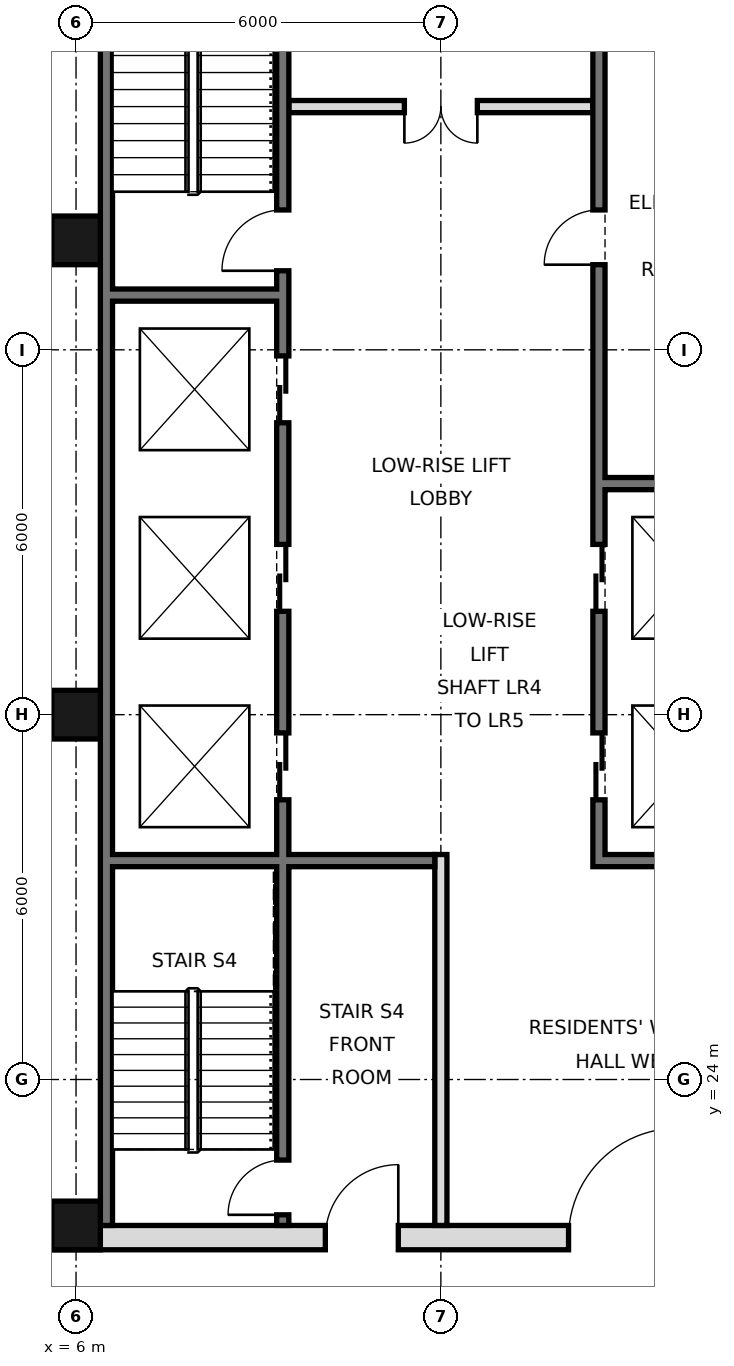
"""IFC4 building model, lengths in metres.
Left out: names, types, materials, properties, quantities, classifications, styles, units other than length and angle.
Written with IfcOpenShell. Run it as: python <this file> out.ifc"""

import sys

from ifc_helpers import new_model, si_unit, direction, frame, frame_2d, origin, origin_2d, place, context, subcontext, project, spatial, rectangle, hollow_rectangle, extrude, element, fill, save


model = new_model("IFC4")
c1 = context("Model", 3, precision=1e-05, world=origin(), true_north=direction((0.0, 1.0)))
c2 = subcontext(c1, "Body", "Model", "MODEL_VIEW")
j1 = project(units=[si_unit("LENGTHUNIT", "METRE"), si_unit("PLANEANGLEUNIT", "RADIAN")], contexts=[c1])
p1 = place(None, origin())
s1 = spatial("IfcSite", under=j1, at=p1, CompositionType="ELEMENT")
p2 = place(p1, origin())
s2 = spatial("IfcBuilding", under=s1, at=p2, CompositionType="ELEMENT")
p3 = place(p2, frame((0.0, 0.0, 71.4)))
s3 = spatial("IfcBuildingStorey", under=s2, at=p3, CompositionType="ELEMENT", Elevation=71.4)
for number, where, z_axis, x_axis in (
    (1, (6.0, 21.6, 0.0), (0.0, 0.0, 1.0), (1.0, 0.0, 0.0)),
    (2, (6.0, 30.0, 0.0), (0.0, 0.0, 1.0), (1.0, 0.0, 0.0)),
    (3, (6.0, 37.8, 0.0), (0.0, 0.0, 1.0), (1.0, 0.0, 0.0)),
):
    element("IfcColumn", number, at=place(p3, frame(where, z_axis=z_axis, x_axis=x_axis)), inside=s3, PredefinedType="COLUMN", context=c2, shape_type="SweptSolid", body=[
        extrude(hollow_rectangle(XDim=0.8, YDim=0.8, WallThickness=0.06, at=origin_2d()), origin(), (0.0, 0.0, 1.0), 3.6),
    ])
p4 = place(p3, frame((6.5, 21.6, 0.0), z_axis=(0.0, 0.0, 1.0), x_axis=(0.0, 1.0, 0.0)))
e4 = element("IfcWall", 4, at=p4, inside=s3, PredefinedType="SOLIDWALL", context=c2, shape_type="SweptSolid", body=[
    extrude(rectangle(XDim=23.5, YDim=0.2, at=frame_2d((11.75, 0.0))), origin(), (0.0, 0.0, 1.0), 3.42),
])
p5 = place(p3, frame((5.6, 21.4, 0.0), z_axis=(0.0, 0.0, 1.0), x_axis=(1.0, 0.0, 0.0)))
e5 = element("IfcWall", 5, at=p5, inside=s3, PredefinedType="SOLIDWALL", context=c2, shape_type="SweptSolid", body=[
    extrude(rectangle(XDim=36.8, YDim=0.4, at=frame_2d((18.4, 0.0))), origin(), (0.0, 0.0, 1.0), 3.42),
])
p6 = place(p5, frame((8.5, 0.0, 0.0)))
e6 = element("IfcOpeningElement", 6, at=p6, cuts=e5, PredefinedType="OPENING", context=c2, shape_type="SweptSolid", body=[
    extrude(rectangle(XDim=1.8, YDim=2.1, at=frame_2d((0.9, 1.05))), frame((0.0, 0.21, 0.0), z_axis=(0.0, -1.0, 0.0), x_axis=(1.0, 0.0, 0.0)), (0.0, 0.0, 1.0), 0.42),
])
p7 = place(p5, frame((17.5, 0.0, 0.0)))
e7 = element("IfcOpeningElement", 7, at=p7, cuts=e5, PredefinedType="OPENING", context=c2, shape_type="SweptSolid", body=[
    extrude(rectangle(XDim=1.8, YDim=2.1, at=frame_2d((0.9, 1.05))), frame((0.0, 0.21, 0.0), z_axis=(0.0, -1.0, 0.0), x_axis=(1.0, 0.0, 0.0)), (0.0, 0.0, 1.0), 0.42),
])
p8 = place(p5, frame((26.5, 0.0, 0.0)))
e8 = element("IfcOpeningElement", 8, at=p8, cuts=e5, PredefinedType="OPENING", context=c2, shape_type="SweptSolid", body=[
    extrude(rectangle(XDim=1.8, YDim=2.1, at=frame_2d((0.9, 1.05))), frame((0.0, 0.21, 0.0), z_axis=(0.0, -1.0, 0.0), x_axis=(1.0, 0.0, 0.0)), (0.0, 0.0, 1.0), 0.42),
])
p9 = place(p5, frame((4.5, 0.0, 0.0)))
e9 = element("IfcOpeningElement", 9, at=p9, cuts=e5, PredefinedType="OPENING", context=c2, shape_type="SweptSolid", body=[
    extrude(rectangle(XDim=1.2, YDim=2.1, at=frame_2d((0.6, 1.05))), frame((0.0, 0.21, 0.0), z_axis=(0.0, -1.0, 0.0), x_axis=(1.0, 0.0, 0.0)), (0.0, 0.0, 1.0), 0.42),
])
p10 = place(p5, frame((31.1, 0.0, 0.0)))
e10 = element("IfcOpeningElement", 10, at=p10, cuts=e5, PredefinedType="OPENING", context=c2, shape_type="SweptSolid", body=[
    extrude(rectangle(XDim=1.2, YDim=2.1, at=frame_2d((0.6, 1.05))), frame((0.0, 0.21, 0.0), z_axis=(0.0, -1.0, 0.0), x_axis=(1.0, 0.0, 0.0)), (0.0, 0.0, 1.0), 0.42),
])
p11 = place(p3, frame((12.0, 21.6, 0.0), z_axis=(0.0, 0.0, 1.0), x_axis=(0.0, 1.0, 0.0)))
e11 = element("IfcWall", 11, at=p11, inside=s3, PredefinedType="PARTITIONING", context=c2, shape_type="SweptSolid", body=[
    extrude(rectangle(XDim=6.1, YDim=0.2, at=frame_2d((3.05, 0.0))), origin(), (0.0, 0.0, 1.0), 3.42),
])
p12 = place(p3, frame((14.6, 27.5, 0.0), z_axis=(0.0, 0.0, 1.0), x_axis=(0.0, 1.0, 0.0)))
e12 = element("IfcWall", 12, at=p12, inside=s3, PredefinedType="SOLIDWALL", context=c2, shape_type="SweptSolid", body=[
    extrude(rectangle(XDim=17.5, YDim=0.2, at=frame_2d((8.75, 0.0))), origin(), (0.0, 0.0, 1.0), 3.42),
])
p13 = place(p12, frame((1.1, 0.0, 0.0)))
e13 = element("IfcOpeningElement", 13, at=p13, cuts=e12, PredefinedType="OPENING", context=c2, shape_type="SweptSolid", body=[
    extrude(rectangle(XDim=1.1, YDim=2.1, at=frame_2d((0.55, 1.05))), frame((0.0, 0.11, 0.0), z_axis=(0.0, -1.0, 0.0), x_axis=(1.0, 0.0, 0.0)), (0.0, 0.0, 1.0), 0.22),
])
p14 = place(p12, frame((4.2, 0.0, 0.0)))
e14 = element("IfcOpeningElement", 14, at=p14, cuts=e12, PredefinedType="OPENING", context=c2, shape_type="SweptSolid", body=[
    extrude(rectangle(XDim=1.1, YDim=2.1, at=frame_2d((0.55, 1.05))), frame((0.0, 0.11, 0.0), z_axis=(0.0, -1.0, 0.0), x_axis=(1.0, 0.0, 0.0)), (0.0, 0.0, 1.0), 0.22),
])
p15 = place(p12, frame((15.4, 0.0, 0.0)))
e15 = element("IfcOpeningElement", 15, at=p15, cuts=e12, PredefinedType="OPENING", context=c2, shape_type="SweptSolid", body=[
    extrude(rectangle(XDim=1.1, YDim=2.1, at=frame_2d((0.55, 1.05))), frame((0.0, 0.11, 0.0), z_axis=(0.0, -1.0, 0.0), x_axis=(1.0, 0.0, 0.0)), (0.0, 0.0, 1.0), 0.22),
])
p16 = place(p12, frame((9.9, 0.0, 0.0)))
e16 = element("IfcOpeningElement", 16, at=p16, cuts=e12, PredefinedType="OPENING", context=c2, shape_type="SweptSolid", body=[
    extrude(rectangle(XDim=0.9, YDim=2.1, at=frame_2d((0.45, 1.05))), frame((0.0, 0.11, 0.0), z_axis=(0.0, -1.0, 0.0), x_axis=(1.0, 0.0, 0.0)), (0.0, 0.0, 1.0), 0.22),
])
p17 = place(p3, frame((9.4, 21.6, 0.0), z_axis=(0.0, 0.0, 1.0), x_axis=(0.0, 1.0, 0.0)))
e17 = element("IfcWall", 17, at=p17, inside=s3, PredefinedType="SOLIDWALL", context=c2, shape_type="SweptSolid", body=[
    extrude(rectangle(XDim=23.4, YDim=0.2, at=frame_2d((11.7, 0.0))), origin(), (0.0, 0.0, 1.0), 3.42),
])
p18 = place(p17, frame((7.0, 0.0, 0.0)))
e18 = element("IfcOpeningElement", 18, at=p18, cuts=e17, PredefinedType="OPENING", context=c2, shape_type="SweptSolid", body=[
    extrude(rectangle(XDim=1.1, YDim=2.1, at=frame_2d((0.55, 1.05))), frame((0.0, 0.11, 0.0), z_axis=(0.0, -1.0, 0.0), x_axis=(1.0, 0.0, 0.0)), (0.0, 0.0, 1.0), 0.22),
])
p19 = place(p17, frame((10.1, 0.0, 0.0)))
e19 = element("IfcOpeningElement", 19, at=p19, cuts=e17, PredefinedType="OPENING", context=c2, shape_type="SweptSolid", body=[
    extrude(rectangle(XDim=1.1, YDim=2.1, at=frame_2d((0.55, 1.05))), frame((0.0, 0.11, 0.0), z_axis=(0.0, -1.0, 0.0), x_axis=(1.0, 0.0, 0.0)), (0.0, 0.0, 1.0), 0.22),
])
p20 = place(p17, frame((13.2, 0.0, 0.0)))
e20 = element("IfcOpeningElement", 20, at=p20, cuts=e17, PredefinedType="OPENING", context=c2, shape_type="SweptSolid", body=[
    extrude(rectangle(XDim=1.1, YDim=2.1, at=frame_2d((0.55, 1.05))), frame((0.0, 0.11, 0.0), z_axis=(0.0, -1.0, 0.0), x_axis=(1.0, 0.0, 0.0)), (0.0, 0.0, 1.0), 0.22),
])
p21 = place(p17, frame((15.7, 0.0, 0.0)))
e21 = element("IfcOpeningElement", 21, at=p21, cuts=e17, PredefinedType="OPENING", context=c2, shape_type="SweptSolid", body=[
    extrude(rectangle(XDim=1.0, YDim=2.1, at=frame_2d((0.5, 1.05))), frame((0.0, 0.11, 0.0), z_axis=(0.0, -1.0, 0.0), x_axis=(1.0, 0.0, 0.0)), (0.0, 0.0, 1.0), 0.22),
])
p22 = place(p17, frame((0.175, 0.0, 0.0)))
e22 = element("IfcOpeningElement", 22, at=p22, cuts=e17, PredefinedType="OPENING", context=c2, shape_type="SweptSolid", body=[
    extrude(rectangle(XDim=0.9, YDim=2.1, at=frame_2d((0.45, 1.05))), frame((0.0, 0.11, 0.0), z_axis=(0.0, -1.0, 0.0), x_axis=(1.0, 0.0, 0.0)), (0.0, 0.0, 1.0), 0.22),
])
p23 = place(p3, frame((14.7, 27.6, 0.0), z_axis=(0.0, 0.0, 1.0), x_axis=(1.0, 0.0, 0.0)))
e23 = element("IfcWall", 23, at=p23, inside=s3, PredefinedType="SOLIDWALL", context=c2, shape_type="SweptSolid", body=[
    extrude(rectangle(XDim=2.7, YDim=0.2, at=frame_2d((1.35, 0.0))), origin(), (0.0, 0.0, 1.0), 3.42),
])
p24 = place(p3, frame((6.6, 27.6, 0.0), z_axis=(0.0, 0.0, 1.0), x_axis=(1.0, 0.0, 0.0)))
e24 = element("IfcWall", 24, at=p24, inside=s3, PredefinedType="SOLIDWALL", context=c2, shape_type="SweptSolid", body=[
    extrude(rectangle(XDim=5.3, YDim=0.2, at=frame_2d((2.65, 0.0))), origin(), (0.0, 0.0, 1.0), 3.42),
])
for number, where, z_axis, x_axis in (
    (25, (14.7, 33.8, 0.0), (0.0, 0.0, 1.0), (1.0, 0.0, 0.0)),
    (26, (6.6, 36.9, 0.0), (0.0, 0.0, 1.0), (1.0, 0.0, 0.0)),
):
    element("IfcWall", number, at=place(p3, frame(where, z_axis=z_axis, x_axis=x_axis)), inside=s3, PredefinedType="SOLIDWALL", context=c2, shape_type="SweptSolid", body=[
        extrude(rectangle(XDim=2.7, YDim=0.2, at=frame_2d((1.35, 0.0))), origin(), (0.0, 0.0, 1.0), 3.42),
    ])
p25 = place(p3, frame((9.5, 40.0, 0.0), z_axis=(0.0, 0.0, 1.0), x_axis=(1.0, 0.0, 0.0)))
e27 = element("IfcWall", 27, at=p25, inside=s3, PredefinedType="PARTITIONING", context=c2, shape_type="SweptSolid", body=[
    extrude(rectangle(XDim=5.0, YDim=0.2, at=frame_2d((2.5, 0.0))), origin(), (0.0, 0.0, 1.0), 3.42),
])
p26 = place(p25, frame((1.9, 0.0, 0.0)))
e28 = element("IfcOpeningElement", 28, at=p26, cuts=e27, PredefinedType="OPENING", context=c2, shape_type="SweptSolid", body=[
    extrude(rectangle(XDim=1.2, YDim=2.1, at=frame_2d((0.6, 1.05))), frame((0.0, 0.11, 0.0), z_axis=(0.0, -1.0, 0.0), x_axis=(1.0, 0.0, 0.0)), (0.0, 0.0, 1.0), 0.22),
])
p27 = place(p6, frame((1.8, 0.0, 0.0), z_axis=(0.0, 0.0, 1.0), x_axis=(-1.0, 0.0, 0.0)))
e29 = element("IfcDoor", 29, at=p27, inside=s3, OperationType="SINGLE_SWING_LEFT", PredefinedType="DOOR", context=c2, shape_type="SweptSolid", body=[
    extrude(rectangle(XDim=1.8, YDim=2.1, at=frame_2d((0.9, 1.05))), frame((0.0, 0.025, 0.0), z_axis=(0.0, -1.0, 0.0), x_axis=(1.0, 0.0, 0.0)), (0.0, 0.0, 1.0), 0.05),
])
fill(e6, e29)
p28 = place(p9, frame((1.2, 0.0, 0.0), z_axis=(0.0, 0.0, 1.0), x_axis=(-1.0, 0.0, 0.0)))
e30 = element("IfcDoor", 30, at=p28, inside=s3, OperationType="SINGLE_SWING_LEFT", PredefinedType="DOOR", context=c2, shape_type="SweptSolid", body=[
    extrude(rectangle(XDim=1.2, YDim=2.1, at=frame_2d((0.6, 1.05))), frame((0.0, 0.025, 0.0), z_axis=(0.0, -1.0, 0.0), x_axis=(1.0, 0.0, 0.0)), (0.0, 0.0, 1.0), 0.05),
])
fill(e9, e30)
p29 = place(p26, frame((1.2, 0.0, 0.0), z_axis=(0.0, 0.0, 1.0), x_axis=(-1.0, 0.0, 0.0)))
e31 = element("IfcDoor", 31, at=p29, inside=s3, OperationType="DOUBLE_DOOR_SINGLE_SWING", PredefinedType="DOOR", context=c2, shape_type="SweptSolid", body=[
    extrude(rectangle(XDim=1.2, YDim=2.1, at=frame_2d((0.6, 1.05))), frame((0.0, 0.025, 0.0), z_axis=(0.0, -1.0, 0.0), x_axis=(1.0, 0.0, 0.0)), (0.0, 0.0, 1.0), 0.05),
])
fill(e28, e31)
p30 = place(p13, origin())
e32 = element("IfcDoor", 32, at=p30, inside=s3, OperationType="DOUBLE_DOOR_SLIDING", PredefinedType="DOOR", context=c2, shape_type="SweptSolid", body=[
    extrude(rectangle(XDim=1.1, YDim=2.1, at=frame_2d((0.55, 1.05))), frame((0.0, 0.025, 0.0), z_axis=(0.0, -1.0, 0.0), x_axis=(1.0, 0.0, 0.0)), (0.0, 0.0, 1.0), 0.05),
])
fill(e13, e32)
p31 = place(p14, origin())
e33 = element("IfcDoor", 33, at=p31, inside=s3, OperationType="DOUBLE_DOOR_SLIDING", PredefinedType="DOOR", context=c2, shape_type="SweptSolid", body=[
    extrude(rectangle(XDim=1.1, YDim=2.1, at=frame_2d((0.55, 1.05))), frame((0.0, 0.025, 0.0), z_axis=(0.0, -1.0, 0.0), x_axis=(1.0, 0.0, 0.0)), (0.0, 0.0, 1.0), 0.05),
])
fill(e14, e33)
p32 = place(p18, origin())
e34 = element("IfcDoor", 34, at=p32, inside=s3, OperationType="DOUBLE_DOOR_SLIDING", PredefinedType="DOOR", context=c2, shape_type="SweptSolid", body=[
    extrude(rectangle(XDim=1.1, YDim=2.1, at=frame_2d((0.55, 1.05))), frame((0.0, 0.025, 0.0), z_axis=(0.0, -1.0, 0.0), x_axis=(1.0, 0.0, 0.0)), (0.0, 0.0, 1.0), 0.05),
])
fill(e18, e34)
p33 = place(p19, origin())
e35 = element("IfcDoor", 35, at=p33, inside=s3, OperationType="DOUBLE_DOOR_SLIDING", PredefinedType="DOOR", context=c2, shape_type="SweptSolid", body=[
    extrude(rectangle(XDim=1.1, YDim=2.1, at=frame_2d((0.55, 1.05))), frame((0.0, 0.025, 0.0), z_axis=(0.0, -1.0, 0.0), x_axis=(1.0, 0.0, 0.0)), (0.0, 0.0, 1.0), 0.05),
])
fill(e19, e35)
p34 = place(p20, origin())
e36 = element("IfcDoor", 36, at=p34, inside=s3, OperationType="DOUBLE_DOOR_SLIDING", PredefinedType="DOOR", context=c2, shape_type="SweptSolid", body=[
    extrude(rectangle(XDim=1.1, YDim=2.1, at=frame_2d((0.55, 1.05))), frame((0.0, 0.025, 0.0), z_axis=(0.0, -1.0, 0.0), x_axis=(1.0, 0.0, 0.0)), (0.0, 0.0, 1.0), 0.05),
])
fill(e20, e36)
p35 = place(p21, origin())
e37 = element("IfcDoor", 37, at=p35, inside=s3, OperationType="SINGLE_SWING_LEFT", PredefinedType="DOOR", context=c2, shape_type="SweptSolid", body=[
    extrude(rectangle(XDim=1.0, YDim=2.1, at=frame_2d((0.5, 1.05))), frame((0.0, 0.025, 0.0), z_axis=(0.0, -1.0, 0.0), x_axis=(1.0, 0.0, 0.0)), (0.0, 0.0, 1.0), 0.05),
])
fill(e21, e37)
p36 = place(p22, origin())
e38 = element("IfcDoor", 38, at=p36, inside=s3, OperationType="SINGLE_SWING_LEFT", PredefinedType="DOOR", context=c2, shape_type="SweptSolid", body=[
    extrude(rectangle(XDim=0.9, YDim=2.1, at=frame_2d((0.45, 1.05))), frame((0.0, 0.025, 0.0), z_axis=(0.0, -1.0, 0.0), x_axis=(1.0, 0.0, 0.0)), (0.0, 0.0, 1.0), 0.05),
])
fill(e22, e38)
p37 = place(p16, origin())
e39 = element("IfcDoor", 39, at=p37, inside=s3, OperationType="SINGLE_SWING_LEFT", PredefinedType="DOOR", context=c2, shape_type="SweptSolid", body=[
    extrude(rectangle(XDim=0.9, YDim=2.1, at=frame_2d((0.45, 1.05))), frame((0.0, 0.025, 0.0), z_axis=(0.0, -1.0, 0.0), x_axis=(1.0, 0.0, 0.0)), (0.0, 0.0, 1.0), 0.05),
])
fill(e16, e39)
save(model, sys.argv[1])
